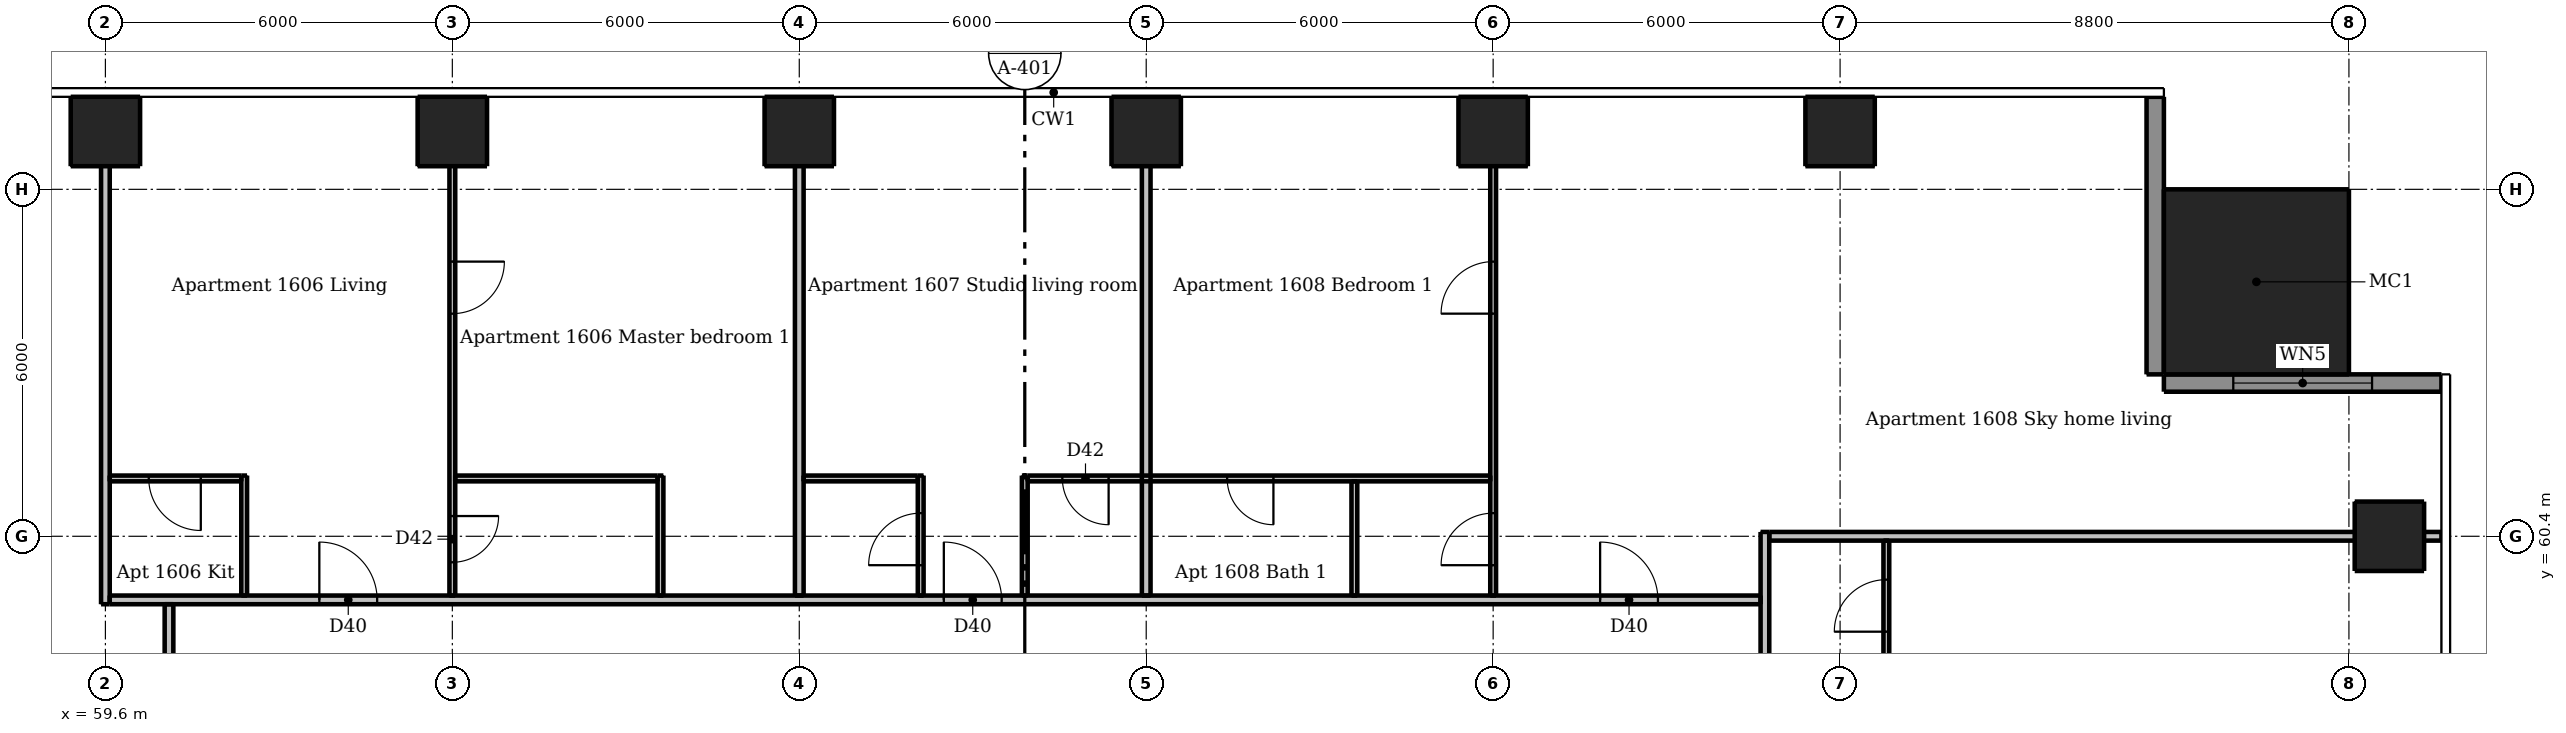
"""IFC4 building model, lengths in metres.
Left out: names, types, materials, properties, quantities, classifications, styles, units other than length and angle.
Written with IfcOpenShell. Run it as: python <this file> out.ifc"""

import sys

from ifc_helpers import new_model, si_unit, direction, frame, frame_2d, origin, origin_2d, place, context, subcontext, project, spatial, rectangle, extrude, element, fill, save


model = new_model("IFC4")
c1 = context("Model", 3, precision=1e-05, world=origin(), true_north=direction((0.0, 1.0)))
c2 = subcontext(c1, "Body", "Model", "MODEL_VIEW")
j1 = project(units=[si_unit("LENGTHUNIT", "METRE"), si_unit("PLANEANGLEUNIT", "RADIAN")], contexts=[c1])
p1 = place(None, origin())
s1 = spatial("IfcSite", under=j1, at=p1, CompositionType="ELEMENT")
p2 = place(p1, origin())
s2 = spatial("IfcBuilding", under=s1, at=p2, CompositionType="ELEMENT")
p3 = place(p2, frame((0.0, 0.0, 59.8)))
s3 = spatial("IfcBuildingStorey", under=s2, at=p3, CompositionType="ELEMENT", Elevation=59.8)
for number, where, z_axis, x_axis in (
    (1, (99.1, 60.4, 0.0), (0.0, 0.0, 1.0), (1.0, 0.0, 0.0)),
    (2, (59.6, 67.4, 0.0), (0.0, 0.0, 1.0), (1.0, 0.0, 0.0)),
    (3, (65.6, 67.4, 0.0), (0.0, 0.0, 1.0), (1.0, 0.0, 0.0)),
    (4, (71.6, 67.4, 0.0), (0.0, 0.0, 1.0), (1.0, 0.0, 0.0)),
    (5, (77.6, 67.4, 0.0), (0.0, 0.0, 1.0), (1.0, 0.0, 0.0)),
    (6, (83.6, 67.4, 0.0), (0.0, 0.0, 1.0), (1.0, 0.0, 0.0)),
    (7, (89.6, 67.4, 0.0), (0.0, 0.0, 1.0), (1.0, 0.0, 0.0)),
):
    element("IfcColumn", number, at=place(p3, frame(where, z_axis=z_axis, x_axis=x_axis)), inside=s3, PredefinedType="COLUMN", context=c2, shape_type="SweptSolid", body=[
        extrude(rectangle(XDim=1.2, YDim=1.2, at=origin_2d()), origin(), (0.0, 0.0, 1.0), 3.05),
    ])
p4 = place(p3, frame((96.8, 64.8, 0.0), z_axis=(0.0, 0.0, 1.0), x_axis=(1.0, 0.0, 0.0)))
e8 = element("IfcColumn", 8, at=p4, inside=s3, PredefinedType="COLUMN", context=c2, shape_type="SweptSolid", body=[
    extrude(rectangle(XDim=3.2, YDim=3.2, at=origin_2d()), origin(), (0.0, 0.0, 1.0), 3.3),
])
p5 = place(p3, frame((100.0, 63.05, 0.0), z_axis=(0.0, 0.0, 1.0), x_axis=(-1.0, 0.0, 0.0)))
e9 = element("IfcWall", 9, at=p5, inside=s3, PredefinedType="SOLIDWALL", context=c2, shape_type="SweptSolid", body=[
    extrude(rectangle(XDim=4.8, YDim=0.3, at=frame_2d((2.4, 0.0))), origin(), (0.0, 0.0, 1.0), 3.05),
])
p6 = place(p5, frame((1.2, 0.0, 0.15)))
e10 = element("IfcOpeningElement", 10, at=p6, cuts=e9, PredefinedType="OPENING", context=c2, shape_type="SweptSolid", body=[
    extrude(rectangle(XDim=2.4, YDim=2.1, at=frame_2d((1.2, 1.05))), frame((0.0, 0.16, 0.0), z_axis=(0.0, -1.0, 0.0), x_axis=(1.0, 0.0, 0.0)), (0.0, 0.0, 1.0), 0.32),
])
p7 = place(p3, frame((95.05, 63.2, 0.0), z_axis=(0.0, 0.0, 1.0), x_axis=(0.0, 1.0, 0.0)))
e11 = element("IfcWall", 11, at=p7, inside=s3, PredefinedType="SOLIDWALL", context=c2, shape_type="SweptSolid", body=[
    extrude(rectangle(XDim=4.8, YDim=0.3, at=frame_2d((2.4, 0.0))), origin(), (0.0, 0.0, 1.0), 3.05),
])
p8 = place(p3, frame((62.0, 59.375, 0.0), z_axis=(0.0, 0.0, 1.0), x_axis=(0.0, 1.0, 0.0)))
e12 = element("IfcWall", 12, at=p8, inside=s3, PredefinedType="PARTITIONING", context=c2, shape_type="SweptSolid", body=[
    extrude(rectangle(XDim=2.075, YDim=0.1, at=frame_2d((1.038, 0.0))), origin(), (0.0, 0.0, 1.0), 3.05),
])
p9 = place(p3, frame((65.6, 68.0, 0.0), z_axis=(0.0, 0.0, 1.0), x_axis=(0.0, -1.0, 0.0)))
e13 = element("IfcWall", 13, at=p9, inside=s3, PredefinedType="PARTITIONING", context=c2, shape_type="SweptSolid", body=[
    extrude(rectangle(XDim=8.625, YDim=0.1, at=frame_2d((4.312, 0.0))), origin(), (0.0, 0.0, 1.0), 2.516),
])
p10 = place(p9, frame((2.85, 0.0, 0.0)))
e14 = element("IfcOpeningElement", 14, at=p10, cuts=e13, PredefinedType="OPENING", context=c2, shape_type="SweptSolid", body=[
    extrude(rectangle(XDim=0.9, YDim=2.1, at=frame_2d((0.45, 1.05))), frame((0.0, 0.06, 0.0), z_axis=(0.0, -1.0, 0.0), x_axis=(1.0, 0.0, 0.0)), (0.0, 0.0, 1.0), 0.12),
])
p11 = place(p9, frame((7.25, 0.0, 0.0)))
e15 = element("IfcOpeningElement", 15, at=p11, cuts=e13, PredefinedType="OPENING", context=c2, shape_type="SweptSolid", body=[
    extrude(rectangle(XDim=0.8, YDim=2.1, at=frame_2d((0.4, 1.05))), frame((0.0, 0.06, 0.0), z_axis=(0.0, -1.0, 0.0), x_axis=(1.0, 0.0, 0.0)), (0.0, 0.0, 1.0), 0.12),
])
p12 = place(p3, frame((69.2, 59.375, 0.0), z_axis=(0.0, 0.0, 1.0), x_axis=(0.0, 1.0, 0.0)))
e16 = element("IfcWall", 16, at=p12, inside=s3, PredefinedType="PARTITIONING", context=c2, shape_type="SweptSolid", body=[
    extrude(rectangle(XDim=2.075, YDim=0.1, at=frame_2d((1.038, 0.0))), origin(), (0.0, 0.0, 1.0), 3.05),
])
p13 = place(p3, frame((73.7, 59.375, 0.0), z_axis=(0.0, 0.0, 1.0), x_axis=(0.0, 1.0, 0.0)))
e17 = element("IfcWall", 17, at=p13, inside=s3, PredefinedType="PARTITIONING", context=c2, shape_type="SweptSolid", body=[
    extrude(rectangle(XDim=2.075, YDim=0.1, at=frame_2d((1.038, 0.0))), origin(), (0.0, 0.0, 1.0), 3.05),
])
p14 = place(p13, frame((0.525, 0.0, 0.0)))
e18 = element("IfcOpeningElement", 18, at=p14, cuts=e17, PredefinedType="OPENING", context=c2, shape_type="SweptSolid", body=[
    extrude(rectangle(XDim=0.9, YDim=2.1, at=frame_2d((0.45, 1.05))), frame((0.0, 0.06, 0.0), z_axis=(0.0, -1.0, 0.0), x_axis=(1.0, 0.0, 0.0)), (0.0, 0.0, 1.0), 0.12),
])
p15 = place(p3, frame((75.5, 59.375, 0.0), z_axis=(0.0, 0.0, 1.0), x_axis=(0.0, 1.0, 0.0)))
e19 = element("IfcWall", 19, at=p15, inside=s3, PredefinedType="PARTITIONING", context=c2, shape_type="SweptSolid", body=[
    extrude(rectangle(XDim=2.075, YDim=0.1, at=frame_2d((1.038, 0.0))), origin(), (0.0, 0.0, 1.0), 3.05),
])
p16 = place(p3, frame((81.2, 59.375, 0.0), z_axis=(0.0, 0.0, 1.0), x_axis=(0.0, 1.0, 0.0)))
e20 = element("IfcWall", 20, at=p16, inside=s3, PredefinedType="PARTITIONING", context=c2, shape_type="SweptSolid", body=[
    extrude(rectangle(XDim=1.975, YDim=0.1, at=frame_2d((0.988, 0.0))), origin(), (0.0, 0.0, 1.0), 3.05),
])
p17 = place(p3, frame((83.6, 59.375, 0.0), z_axis=(0.0, 0.0, 1.0), x_axis=(0.0, 1.0, 0.0)))
e21 = element("IfcWall", 21, at=p17, inside=s3, PredefinedType="PARTITIONING", context=c2, shape_type="SweptSolid", body=[
    extrude(rectangle(XDim=8.625, YDim=0.1, at=frame_2d((4.312, 0.0))), origin(), (0.0, 0.0, 1.0), 2.516),
])
p18 = place(p17, frame((0.525, 0.0, 0.0)))
e22 = element("IfcOpeningElement", 22, at=p18, cuts=e21, PredefinedType="OPENING", context=c2, shape_type="SweptSolid", body=[
    extrude(rectangle(XDim=0.9, YDim=2.1, at=frame_2d((0.45, 1.05))), frame((0.0, 0.06, 0.0), z_axis=(0.0, -1.0, 0.0), x_axis=(1.0, 0.0, 0.0)), (0.0, 0.0, 1.0), 0.12),
])
p19 = place(p17, frame((4.875, 0.0, 0.0)))
e23 = element("IfcOpeningElement", 23, at=p19, cuts=e21, PredefinedType="OPENING", context=c2, shape_type="SweptSolid", body=[
    extrude(rectangle(XDim=0.9, YDim=2.1, at=frame_2d((0.45, 1.05))), frame((0.0, 0.06, 0.0), z_axis=(0.0, -1.0, 0.0), x_axis=(1.0, 0.0, 0.0)), (0.0, 0.0, 1.0), 0.12),
])
p20 = place(p3, frame((90.4, 57.95, 0.0), z_axis=(0.0, 0.0, 1.0), x_axis=(0.0, 1.0, 0.0)))
e24 = element("IfcWall", 24, at=p20, inside=s3, PredefinedType="PARTITIONING", context=c2, shape_type="SweptSolid", body=[
    extrude(rectangle(XDim=2.375, YDim=0.1, at=frame_2d((1.188, 0.0))), origin(), (0.0, 0.0, 1.0), 3.05),
])
p21 = place(p20, frame((0.8, 0.0, 0.0)))
e25 = element("IfcOpeningElement", 25, at=p21, cuts=e24, PredefinedType="OPENING", context=c2, shape_type="SweptSolid", body=[
    extrude(rectangle(XDim=0.9, YDim=2.1, at=frame_2d((0.45, 1.05))), frame((0.0, 0.06, 0.0), z_axis=(0.0, -1.0, 0.0), x_axis=(1.0, 0.0, 0.0)), (0.0, 0.0, 1.0), 0.12),
])
p22 = place(p3, frame((61.95, 61.4, 0.0), z_axis=(0.0, 0.0, 1.0), x_axis=(-1.0, 0.0, 0.0)))
e26 = element("IfcWall", 26, at=p22, inside=s3, PredefinedType="PARTITIONING", context=c2, shape_type="SweptSolid", body=[
    extrude(rectangle(XDim=2.275, YDim=0.1, at=frame_2d((1.137, 0.0))), origin(), (0.0, 0.0, 1.0), 3.05),
])
p23 = place(p22, frame((0.7, 0.0, 0.0)))
e27 = element("IfcOpeningElement", 27, at=p23, cuts=e26, PredefinedType="OPENING", context=c2, shape_type="SweptSolid", body=[
    extrude(rectangle(XDim=0.9, YDim=2.1, at=frame_2d((0.45, 1.05))), frame((0.0, 0.06, 0.0), z_axis=(0.0, -1.0, 0.0), x_axis=(1.0, 0.0, 0.0)), (0.0, 0.0, 1.0), 0.12),
])
p24 = place(p3, frame((65.65, 61.4, 0.0), z_axis=(0.0, 0.0, 1.0), x_axis=(1.0, 0.0, 0.0)))
e28 = element("IfcWall", 28, at=p24, inside=s3, PredefinedType="PARTITIONING", context=c2, shape_type="SweptSolid", body=[
    extrude(rectangle(XDim=3.5, YDim=0.1, at=frame_2d((1.75, 0.0))), origin(), (0.0, 0.0, 1.0), 3.05),
])
p25 = place(p3, frame((71.675, 61.4, 0.0), z_axis=(0.0, 0.0, 1.0), x_axis=(1.0, 0.0, 0.0)))
e29 = element("IfcWall", 29, at=p25, inside=s3, PredefinedType="PARTITIONING", context=c2, shape_type="SweptSolid", body=[
    extrude(rectangle(XDim=1.975, YDim=0.1, at=frame_2d((0.987, 0.0))), origin(), (0.0, 0.0, 1.0), 3.05),
])
p26 = place(p3, frame((83.55, 61.4, 0.0), z_axis=(0.0, 0.0, 1.0), x_axis=(-1.0, 0.0, 0.0)))
e30 = element("IfcWall", 30, at=p26, inside=s3, PredefinedType="PARTITIONING", context=c2, shape_type="SweptSolid", body=[
    extrude(rectangle(XDim=8.0, YDim=0.1, at=frame_2d((4.0, 0.0))), origin(), (0.0, 0.0, 1.0), 3.05),
])
p27 = place(p26, frame((6.6, 0.0, 0.0)))
e31 = element("IfcOpeningElement", 31, at=p27, cuts=e30, PredefinedType="OPENING", context=c2, shape_type="SweptSolid", body=[
    extrude(rectangle(XDim=0.8, YDim=2.1, at=frame_2d((0.4, 1.05))), frame((0.0, 0.06, 0.0), z_axis=(0.0, -1.0, 0.0), x_axis=(1.0, 0.0, 0.0)), (0.0, 0.0, 1.0), 0.12),
])
p28 = place(p26, frame((3.75, 0.0, 0.0)))
e32 = element("IfcOpeningElement", 32, at=p28, cuts=e30, PredefinedType="OPENING", context=c2, shape_type="SweptSolid", body=[
    extrude(rectangle(XDim=0.8, YDim=2.1, at=frame_2d((0.4, 1.05))), frame((0.0, 0.06, 0.0), z_axis=(0.0, -1.0, 0.0), x_axis=(1.0, 0.0, 0.0)), (0.0, 0.0, 1.0), 0.12),
])
p29 = place(p3, frame((59.6, 59.225, 0.0), z_axis=(0.0, 0.0, 1.0), x_axis=(0.0, 1.0, 0.0)))
e33 = element("IfcWall", 33, at=p29, inside=s3, PredefinedType="PARTITIONING", context=c2, shape_type="SweptSolid", body=[
    extrude(rectangle(XDim=8.775, YDim=0.15, at=frame_2d((4.387, 0.0))), origin(), (0.0, 0.0, 1.0), 2.51),
])
p30 = place(p3, frame((60.7, 30.325, 0.0), z_axis=(0.0, 0.0, 1.0), x_axis=(0.0, 1.0, 0.0)))
e34 = element("IfcWall", 34, at=p30, inside=s3, PredefinedType="PARTITIONING", context=c2, shape_type="SweptSolid", body=[
    extrude(rectangle(XDim=28.9, YDim=0.15, at=frame_2d((14.45, 0.0))), origin(), (0.0, 0.0, 1.0), 3.05),
])
p31 = place(p30, frame((7.375, 0.0, 0.0)))
e35 = element("IfcOpeningElement", 35, at=p31, cuts=e34, PredefinedType="OPENING", context=c2, shape_type="SweptSolid", body=[
    extrude(rectangle(XDim=1.0, YDim=2.1, at=frame_2d((0.5, 1.05))), frame((0.0, 0.085, 0.0), z_axis=(0.0, -1.0, 0.0), x_axis=(1.0, 0.0, 0.0)), (0.0, 0.0, 1.0), 0.17),
])
p32 = place(p30, frame((14.575, 0.0, 0.0)))
e36 = element("IfcOpeningElement", 36, at=p32, cuts=e34, PredefinedType="OPENING", context=c2, shape_type="SweptSolid", body=[
    extrude(rectangle(XDim=1.0, YDim=2.1, at=frame_2d((0.5, 1.05))), frame((0.0, 0.085, 0.0), z_axis=(0.0, -1.0, 0.0), x_axis=(1.0, 0.0, 0.0)), (0.0, 0.0, 1.0), 0.17),
])
p33 = place(p30, frame((26.025, 0.0, 0.0)))
e37 = element("IfcOpeningElement", 37, at=p33, cuts=e34, PredefinedType="OPENING", context=c2, shape_type="SweptSolid", body=[
    extrude(rectangle(XDim=1.0, YDim=2.1, at=frame_2d((0.5, 1.05))), frame((0.0, 0.085, 0.0), z_axis=(0.0, -1.0, 0.0), x_axis=(1.0, 0.0, 0.0)), (0.0, 0.0, 1.0), 0.17),
])
for number, where, z_axis, x_axis in (
    (38, (71.6, 59.375, 0.0), (0.0, 0.0, 1.0), (0.0, 1.0, 0.0)),
    (39, (77.6, 59.375, 0.0), (0.0, 0.0, 1.0), (0.0, 1.0, 0.0)),
):
    element("IfcWall", number, at=place(p3, frame(where, z_axis=z_axis, x_axis=x_axis)), inside=s3, PredefinedType="PARTITIONING", context=c2, shape_type="SweptSolid", body=[
        extrude(rectangle(XDim=8.625, YDim=0.15, at=frame_2d((4.312, 0.0))), origin(), (0.0, 0.0, 1.0), 2.516),
    ])
p34 = place(p3, frame((88.3, 60.475, 0.0), z_axis=(0.0, 0.0, 1.0), x_axis=(0.0, -1.0, 0.0)))
e40 = element("IfcWall", 40, at=p34, inside=s3, PredefinedType="PARTITIONING", context=c2, shape_type="SweptSolid", body=[
    extrude(rectangle(XDim=28.7, YDim=0.15, at=frame_2d((14.35, 0.0))), origin(), (0.0, 0.0, 1.0), 3.05),
])
p35 = place(p34, frame((27.425, 0.0, 0.0)))
e41 = element("IfcOpeningElement", 41, at=p35, cuts=e40, PredefinedType="OPENING", context=c2, shape_type="SweptSolid", body=[
    extrude(rectangle(XDim=1.0, YDim=2.1, at=frame_2d((0.5, 1.05))), frame((0.0, 0.085, 0.0), z_axis=(0.0, -1.0, 0.0), x_axis=(1.0, 0.0, 0.0)), (0.0, 0.0, 1.0), 0.17),
])
p36 = place(p34, frame((14.525, 0.0, 0.0)))
e42 = element("IfcOpeningElement", 42, at=p36, cuts=e40, PredefinedType="OPENING", context=c2, shape_type="SweptSolid", body=[
    extrude(rectangle(XDim=1.0, YDim=2.1, at=frame_2d((0.5, 1.05))), frame((0.0, 0.085, 0.0), z_axis=(0.0, -1.0, 0.0), x_axis=(1.0, 0.0, 0.0)), (0.0, 0.0, 1.0), 0.17),
])
p37 = place(p34, frame((3.775, 0.0, 0.0)))
e43 = element("IfcOpeningElement", 43, at=p37, cuts=e40, PredefinedType="OPENING", context=c2, shape_type="SweptSolid", body=[
    extrude(rectangle(XDim=1.0, YDim=2.1, at=frame_2d((0.5, 1.05))), frame((0.0, 0.085, 0.0), z_axis=(0.0, -1.0, 0.0), x_axis=(1.0, 0.0, 0.0)), (0.0, 0.0, 1.0), 0.17),
])
p38 = place(p3, frame((88.375, 60.4, 0.0), z_axis=(0.0, 0.0, 1.0), x_axis=(1.0, 0.0, 0.0)))
e44 = element("IfcWall", 44, at=p38, inside=s3, PredefinedType="PARTITIONING", context=c2, shape_type="SweptSolid", body=[
    extrude(rectangle(XDim=11.625, YDim=0.15, at=frame_2d((5.812, 0.0))), origin(), (0.0, 0.0, 1.0), 2.516),
])
p39 = place(p3, frame((59.675, 59.3, 0.0), z_axis=(0.0, 0.0, 1.0), x_axis=(1.0, 0.0, 0.0)))
e45 = element("IfcWall", 45, at=p39, inside=s3, PredefinedType="PARTITIONING", context=c2, shape_type="SweptSolid", body=[
    extrude(rectangle(XDim=28.55, YDim=0.15, at=frame_2d((14.275, 0.0))), origin(), (0.0, 0.0, 1.0), 3.05),
])
p40 = place(p39, frame((3.625, 0.0, 0.0)))
e46 = element("IfcOpeningElement", 46, at=p40, cuts=e45, PredefinedType="OPENING", context=c2, shape_type="SweptSolid", body=[
    extrude(rectangle(XDim=1.0, YDim=2.1, at=frame_2d((0.5, 1.05))), frame((0.0, 0.085, 0.0), z_axis=(0.0, -1.0, 0.0), x_axis=(1.0, 0.0, 0.0)), (0.0, 0.0, 1.0), 0.17),
])
p41 = place(p39, frame((14.425, 0.0, 0.0)))
e47 = element("IfcOpeningElement", 47, at=p41, cuts=e45, PredefinedType="OPENING", context=c2, shape_type="SweptSolid", body=[
    extrude(rectangle(XDim=1.0, YDim=2.1, at=frame_2d((0.5, 1.05))), frame((0.0, 0.085, 0.0), z_axis=(0.0, -1.0, 0.0), x_axis=(1.0, 0.0, 0.0)), (0.0, 0.0, 1.0), 0.17),
])
p42 = place(p39, frame((25.775, 0.0, 0.0)))
e48 = element("IfcOpeningElement", 48, at=p42, cuts=e45, PredefinedType="OPENING", context=c2, shape_type="SweptSolid", body=[
    extrude(rectangle(XDim=1.0, YDim=2.1, at=frame_2d((0.5, 1.05))), frame((0.0, 0.085, 0.0), z_axis=(0.0, -1.0, 0.0), x_axis=(1.0, 0.0, 0.0)), (0.0, 0.0, 1.0), 0.17),
])
p43 = place(p6, origin())
e49 = element("IfcWindow", 49, at=p43, inside=s3, PartitioningType="DOUBLE_PANEL_VERTICAL", PredefinedType="WINDOW", context=c2, shape_type="SweptSolid", body=[
    extrude(rectangle(XDim=2.4, YDim=2.1, at=frame_2d((1.2, 1.05))), frame((0.0, 0.03, 0.0), z_axis=(0.0, -1.0, 0.0), x_axis=(1.0, 0.0, 0.0)), (0.0, 0.0, 1.0), 0.06),
])
fill(e10, e49)
p44 = place(p21, origin())
e50 = element("IfcDoor", 50, at=p44, inside=s3, OperationType="SINGLE_SWING_LEFT", PredefinedType="DOOR", context=c2, shape_type="SweptSolid", body=[
    extrude(rectangle(XDim=0.9, YDim=2.1, at=frame_2d((0.45, 1.05))), frame((0.0, 0.025, 0.0), z_axis=(0.0, -1.0, 0.0), x_axis=(1.0, 0.0, 0.0)), (0.0, 0.0, 1.0), 0.05),
])
fill(e25, e50)
p45 = place(p40, origin())
e51 = element("IfcDoor", 51, at=p45, inside=s3, OperationType="SINGLE_SWING_LEFT", PredefinedType="DOOR", context=c2, shape_type="SweptSolid", body=[
    extrude(rectangle(XDim=1.0, YDim=2.1, at=frame_2d((0.5, 1.05))), frame((0.0, 0.025, 0.0), z_axis=(0.0, -1.0, 0.0), x_axis=(1.0, 0.0, 0.0)), (0.0, 0.0, 1.0), 0.05),
])
fill(e46, e51)
p46 = place(p23, origin())
e52 = element("IfcDoor", 52, at=p46, inside=s3, OperationType="SINGLE_SWING_LEFT", PredefinedType="DOOR", context=c2, shape_type="SweptSolid", body=[
    extrude(rectangle(XDim=0.9, YDim=2.1, at=frame_2d((0.45, 1.05))), frame((0.0, 0.025, 0.0), z_axis=(0.0, -1.0, 0.0), x_axis=(1.0, 0.0, 0.0)), (0.0, 0.0, 1.0), 0.05),
])
fill(e27, e52)
p47 = place(p10, origin())
e53 = element("IfcDoor", 53, at=p47, inside=s3, OperationType="SINGLE_SWING_LEFT", PredefinedType="DOOR", context=c2, shape_type="SweptSolid", body=[
    extrude(rectangle(XDim=0.9, YDim=2.1, at=frame_2d((0.45, 1.05))), frame((0.0, 0.025, 0.0), z_axis=(0.0, -1.0, 0.0), x_axis=(1.0, 0.0, 0.0)), (0.0, 0.0, 1.0), 0.05),
])
fill(e14, e53)
p48 = place(p11, origin())
e54 = element("IfcDoor", 54, at=p48, inside=s3, OperationType="SINGLE_SWING_LEFT", PredefinedType="DOOR", context=c2, shape_type="SweptSolid", body=[
    extrude(rectangle(XDim=0.8, YDim=2.1, at=frame_2d((0.4, 1.05))), frame((0.0, 0.025, 0.0), z_axis=(0.0, -1.0, 0.0), x_axis=(1.0, 0.0, 0.0)), (0.0, 0.0, 1.0), 0.05),
])
fill(e15, e54)
p49 = place(p41, origin())
e55 = element("IfcDoor", 55, at=p49, inside=s3, OperationType="SINGLE_SWING_LEFT", PredefinedType="DOOR", context=c2, shape_type="SweptSolid", body=[
    extrude(rectangle(XDim=1.0, YDim=2.1, at=frame_2d((0.5, 1.05))), frame((0.0, 0.025, 0.0), z_axis=(0.0, -1.0, 0.0), x_axis=(1.0, 0.0, 0.0)), (0.0, 0.0, 1.0), 0.05),
])
fill(e47, e55)
p50 = place(p14, origin())
e56 = element("IfcDoor", 56, at=p50, inside=s3, OperationType="SINGLE_SWING_LEFT", PredefinedType="DOOR", context=c2, shape_type="SweptSolid", body=[
    extrude(rectangle(XDim=0.9, YDim=2.1, at=frame_2d((0.45, 1.05))), frame((0.0, 0.025, 0.0), z_axis=(0.0, -1.0, 0.0), x_axis=(1.0, 0.0, 0.0)), (0.0, 0.0, 1.0), 0.05),
])
fill(e18, e56)
p51 = place(p27, origin())
e57 = element("IfcDoor", 57, at=p51, inside=s3, OperationType="SINGLE_SWING_LEFT", PredefinedType="DOOR", context=c2, shape_type="SweptSolid", body=[
    extrude(rectangle(XDim=0.8, YDim=2.1, at=frame_2d((0.4, 1.05))), frame((0.0, 0.025, 0.0), z_axis=(0.0, -1.0, 0.0), x_axis=(1.0, 0.0, 0.0)), (0.0, 0.0, 1.0), 0.05),
])
fill(e31, e57)
p52 = place(p42, origin())
e58 = element("IfcDoor", 58, at=p52, inside=s3, OperationType="SINGLE_SWING_LEFT", PredefinedType="DOOR", context=c2, shape_type="SweptSolid", body=[
    extrude(rectangle(XDim=1.0, YDim=2.1, at=frame_2d((0.5, 1.05))), frame((0.0, 0.025, 0.0), z_axis=(0.0, -1.0, 0.0), x_axis=(1.0, 0.0, 0.0)), (0.0, 0.0, 1.0), 0.05),
])
fill(e48, e58)
p53 = place(p18, origin())
e59 = element("IfcDoor", 59, at=p53, inside=s3, OperationType="SINGLE_SWING_LEFT", PredefinedType="DOOR", context=c2, shape_type="SweptSolid", body=[
    extrude(rectangle(XDim=0.9, YDim=2.1, at=frame_2d((0.45, 1.05))), frame((0.0, 0.025, 0.0), z_axis=(0.0, -1.0, 0.0), x_axis=(1.0, 0.0, 0.0)), (0.0, 0.0, 1.0), 0.05),
])
fill(e22, e59)
p54 = place(p19, origin())
e60 = element("IfcDoor", 60, at=p54, inside=s3, OperationType="SINGLE_SWING_LEFT", PredefinedType="DOOR", context=c2, shape_type="SweptSolid", body=[
    extrude(rectangle(XDim=0.9, YDim=2.1, at=frame_2d((0.45, 1.05))), frame((0.0, 0.025, 0.0), z_axis=(0.0, -1.0, 0.0), x_axis=(1.0, 0.0, 0.0)), (0.0, 0.0, 1.0), 0.05),
])
fill(e23, e60)
p55 = place(p28, origin())
e61 = element("IfcDoor", 61, at=p55, inside=s3, OperationType="SINGLE_SWING_LEFT", PredefinedType="DOOR", context=c2, shape_type="SweptSolid", body=[
    extrude(rectangle(XDim=0.8, YDim=2.1, at=frame_2d((0.4, 1.05))), frame((0.0, 0.025, 0.0), z_axis=(0.0, -1.0, 0.0), x_axis=(1.0, 0.0, 0.0)), (0.0, 0.0, 1.0), 0.05),
])
fill(e32, e61)
save(model, sys.argv[1])
